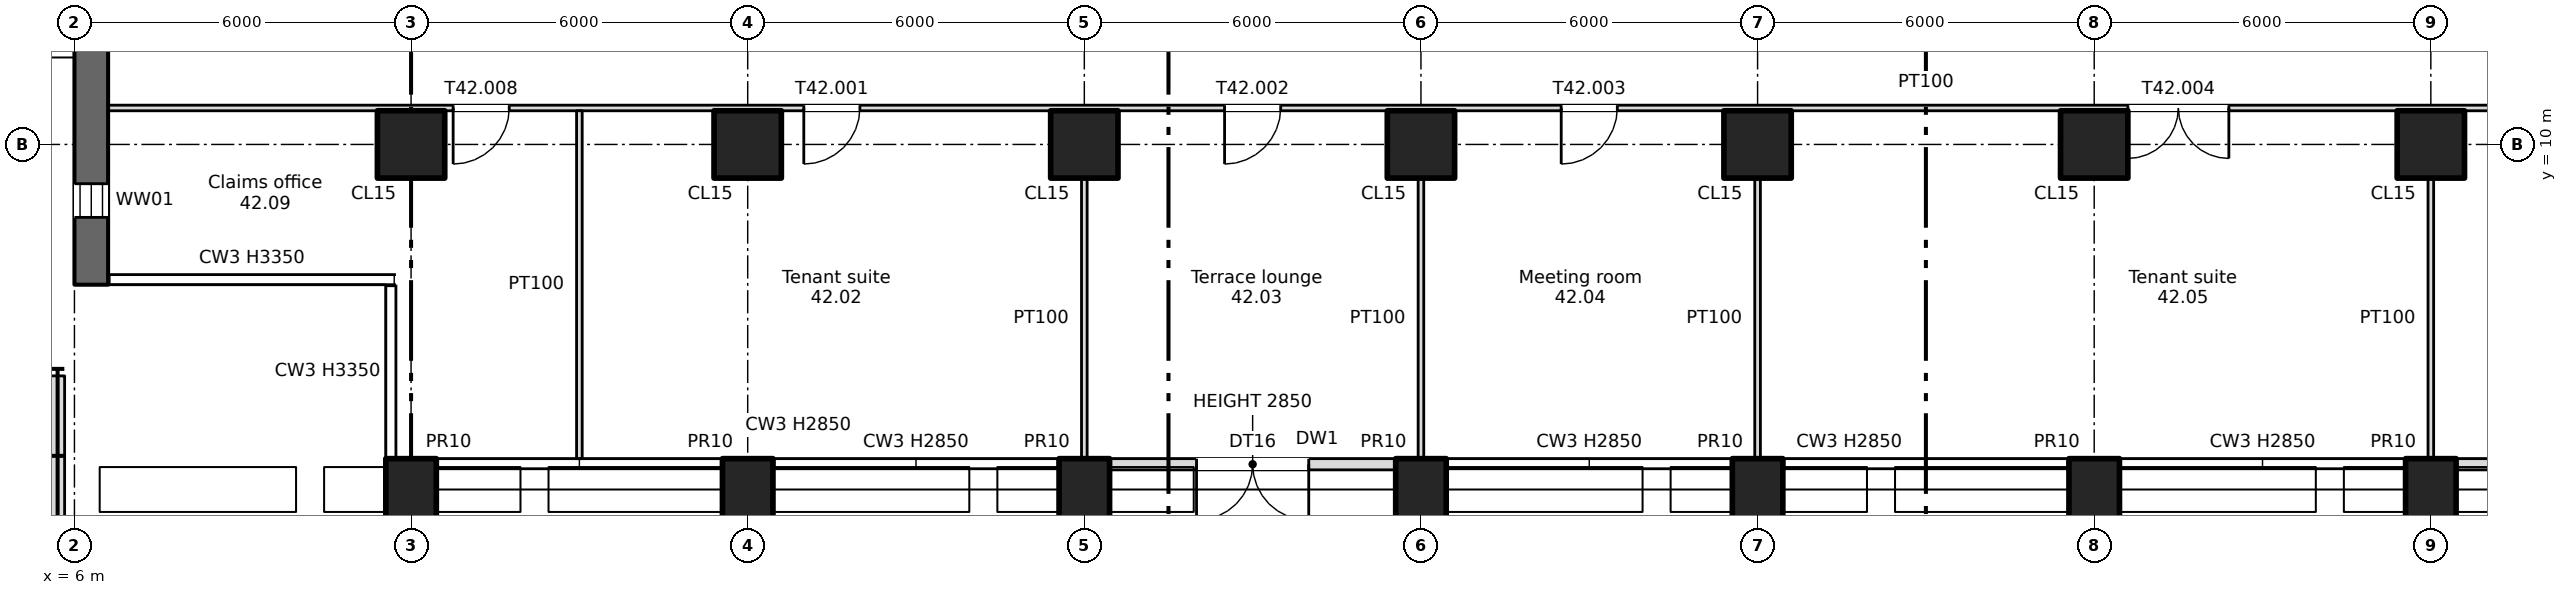
"""IFC4 building model, lengths in metres.
Left out: names, types, materials, properties, quantities, classifications, styles, units other than length and angle.
Written with IfcOpenShell. Run it as: python <this file> out.ifc"""

import sys

from ifc_helpers import new_model, si_unit, direction, frame, frame_2d, origin, origin_2d, place, context, subcontext, project, spatial, rectangle, extrude, element, fill, save


model = new_model("IFC4")
c1 = context("Model", 3, precision=1e-05, world=origin(), true_north=direction((0.0, 1.0)))
c2 = subcontext(c1, "Body", "Model", "MODEL_VIEW")
j1 = project(units=[si_unit("LENGTHUNIT", "METRE"), si_unit("PLANEANGLEUNIT", "RADIAN")], contexts=[c1])
p1 = place(None, origin())
s1 = spatial("IfcSite", under=j1, at=p1, CompositionType="ELEMENT")
p2 = place(p1, origin())
s2 = spatial("IfcBuilding", under=s1, at=p2, CompositionType="ELEMENT")
p3 = place(p2, frame((0.0, 0.0, 166.75)))
s3 = spatial("IfcBuildingStorey", under=s2, at=p3, CompositionType="ELEMENT", Elevation=166.75)
for number, where, z_axis, x_axis in (
    (1, (12.0, 3.7, 0.0), (0.0, 0.0, 1.0), (1.0, 0.0, 0.0)),
    (2, (18.0, 3.7, 0.0), (0.0, 0.0, 1.0), (1.0, 0.0, 0.0)),
    (3, (24.0, 3.7, 0.0), (0.0, 0.0, 1.0), (1.0, 0.0, 0.0)),
    (4, (30.0, 3.7, 0.0), (0.0, 0.0, 1.0), (1.0, 0.0, 0.0)),
    (5, (36.0, 3.7, 0.0), (0.0, 0.0, 1.0), (1.0, 0.0, 0.0)),
    (6, (42.0, 3.7, 0.0), (0.0, 0.0, 1.0), (1.0, 0.0, 0.0)),
    (7, (48.0, 3.7, 0.0), (0.0, 0.0, 1.0), (1.0, 0.0, 0.0)),
):
    element("IfcColumn", number, at=place(p3, frame(where, z_axis=z_axis, x_axis=x_axis)), inside=s3, PredefinedType="COLUMN", context=c2, shape_type="SweptSolid", body=[
        extrude(rectangle(XDim=0.9, YDim=1.4, at=origin_2d()), origin(), (0.0, 0.0, 1.0), 3.35),
    ])
for number, where, z_axis, x_axis in (
    (8, (12.0, 10.0, 0.0), (0.0, 0.0, 1.0), (1.0, 0.0, 0.0)),
    (9, (18.0, 10.0, 0.0), (0.0, 0.0, 1.0), (1.0, 0.0, 0.0)),
    (10, (24.0, 10.0, 0.0), (0.0, 0.0, 1.0), (1.0, 0.0, 0.0)),
    (11, (30.0, 10.0, 0.0), (0.0, 0.0, 1.0), (1.0, 0.0, 0.0)),
    (12, (36.0, 10.0, 0.0), (0.0, 0.0, 1.0), (1.0, 0.0, 0.0)),
    (13, (42.0, 10.0, 0.0), (0.0, 0.0, 1.0), (1.0, 0.0, 0.0)),
    (14, (48.0, 10.0, 0.0), (0.0, 0.0, 1.0), (1.0, 0.0, 0.0)),
):
    element("IfcColumn", number, at=place(p3, frame(where, z_axis=z_axis, x_axis=x_axis)), inside=s3, PredefinedType="COLUMN", context=c2, shape_type="SweptSolid", body=[
        extrude(rectangle(XDim=1.2, YDim=1.2, at=origin_2d()), origin(), (0.0, 0.0, 1.0), 3.35),
    ])
p4 = place(p3, frame((6.3, 7.5, 0.0), z_axis=(0.0, 0.0, 1.0), x_axis=(0.0, 1.0, 0.0)))
e15 = element("IfcWall", 15, at=p4, inside=s3, PredefinedType="SHEAR", context=c2, shape_type="SweptSolid", body=[
    extrude(rectangle(XDim=34.0, YDim=0.6, at=frame_2d((17.0, 0.0))), origin(), (0.0, 0.0, 1.0), 3.35),
])
p5 = place(p4, frame((1.2, 0.0, 0.6)))
e16 = element("IfcOpeningElement", 16, at=p5, cuts=e15, PredefinedType="OPENING", context=c2, shape_type="SweptSolid", body=[
    extrude(rectangle(XDim=0.6, YDim=2.4, at=frame_2d((0.3, 1.2))), frame((0.0, 0.31, 0.0), z_axis=(0.0, -1.0, 0.0), x_axis=(1.0, 0.0, 0.0)), (0.0, 0.0, 1.0), 0.62),
])
p6 = place(p4, frame((13.2, 0.0, 0.6)))
e17 = element("IfcOpeningElement", 17, at=p6, cuts=e15, PredefinedType="OPENING", context=c2, shape_type="SweptSolid", body=[
    extrude(rectangle(XDim=0.6, YDim=2.4, at=frame_2d((0.3, 1.2))), frame((0.0, 0.31, 0.0), z_axis=(0.0, -1.0, 0.0), x_axis=(1.0, 0.0, 0.0)), (0.0, 0.0, 1.0), 0.62),
])
p7 = place(p4, frame((19.2, 0.0, 0.6)))
e18 = element("IfcOpeningElement", 18, at=p7, cuts=e15, PredefinedType="OPENING", context=c2, shape_type="SweptSolid", body=[
    extrude(rectangle(XDim=0.6, YDim=2.4, at=frame_2d((0.3, 1.2))), frame((0.0, 0.31, 0.0), z_axis=(0.0, -1.0, 0.0), x_axis=(1.0, 0.0, 0.0)), (0.0, 0.0, 1.0), 0.62),
])
p8 = place(p4, frame((6.9, 0.0, 0.0)))
e19 = element("IfcOpeningElement", 19, at=p8, cuts=e15, PredefinedType="OPENING", context=c2, shape_type="SweptSolid", body=[
    extrude(rectangle(XDim=1.2, YDim=2.4, at=frame_2d((0.6, 1.2))), frame((0.0, 0.31, 0.0), z_axis=(0.0, -1.0, 0.0), x_axis=(1.0, 0.0, 0.0)), (0.0, 0.0, 1.0), 0.62),
])
p9 = place(p3, frame((24.45, 4.3, 0.0), z_axis=(0.0, 0.0, 1.0), x_axis=(1.0, 0.0, 0.0)))
e20 = element("IfcWall", 20, at=p9, inside=s3, PredefinedType="SOLIDWALL", context=c2, shape_type="SweptSolid", body=[
    extrude(rectangle(XDim=5.1, YDim=0.2, at=frame_2d((2.55, 0.0))), origin(), (0.0, 0.0, 1.0), 2.85),
])
p10 = place(p9, frame((1.55, 0.0, 0.0)))
e21 = element("IfcOpeningElement", 21, at=p10, cuts=e20, PredefinedType="OPENING", context=c2, shape_type="SweptSolid", body=[
    extrude(rectangle(XDim=2.0, YDim=2.4, at=frame_2d((1.0, 1.2))), frame((0.0, 0.11, 0.0), z_axis=(0.0, -1.0, 0.0), x_axis=(1.0, 0.0, 0.0)), (0.0, 0.0, 1.0), 0.22),
])
p11 = place(p3, frame((48.45, 4.3, 0.0), z_axis=(0.0, 0.0, 1.0), x_axis=(1.0, 0.0, 0.0)))
e22 = element("IfcWall", 22, at=p11, inside=s3, PredefinedType="SOLIDWALL", context=c2, shape_type="SweptSolid", body=[
    extrude(rectangle(XDim=5.1, YDim=0.2, at=frame_2d((2.55, 0.0))), origin(), (0.0, 0.0, 1.0), 2.85),
])
p12 = place(p11, frame((1.55, 0.0, 0.0)))
e23 = element("IfcOpeningElement", 23, at=p12, cuts=e22, PredefinedType="OPENING", context=c2, shape_type="SweptSolid", body=[
    extrude(rectangle(XDim=2.0, YDim=2.4, at=frame_2d((1.0, 1.2))), frame((0.0, 0.11, 0.0), z_axis=(0.0, -1.0, 0.0), x_axis=(1.0, 0.0, 0.0)), (0.0, 0.0, 1.0), 0.22),
])
p13 = place(p3, frame((5.7, 3.025, 0.0), z_axis=(0.0, 0.0, 1.0), x_axis=(0.0, 1.0, 0.0)))
e24 = element("IfcWall", 24, at=p13, inside=s3, PredefinedType="PARAPET", context=c2, shape_type="SweptSolid", body=[
    extrude(rectangle(XDim=2.85, YDim=0.25, at=frame_2d((1.425, 0.0))), origin(), (0.0, 0.0, 1.0), 0.3),
])
p14 = place(p3, frame((6.6, 10.65, 0.0), z_axis=(0.0, 0.0, 1.0), x_axis=(1.0, 0.0, 0.0)))
e25 = element("IfcWall", 25, at=p14, inside=s3, PredefinedType="PARTITIONING", context=c2, shape_type="SweptSolid", body=[
    extrude(rectangle(XDim=64.8, YDim=0.1, at=frame_2d((32.4, 0.0))), origin(), (0.0, 0.0, 1.0), 3.35),
])
p15 = place(p14, frame((12.4, 0.0, 0.0)))
e26 = element("IfcOpeningElement", 26, at=p15, cuts=e25, PredefinedType="OPENING", context=c2, shape_type="SweptSolid", body=[
    extrude(rectangle(XDim=1.0, YDim=2.1, at=frame_2d((0.5, 1.05))), frame((0.0, 0.06, 0.0), z_axis=(0.0, -1.0, 0.0), x_axis=(1.0, 0.0, 0.0)), (0.0, 0.0, 1.0), 0.12),
])
p16 = place(p14, frame((19.9, 0.0, 0.0)))
e27 = element("IfcOpeningElement", 27, at=p16, cuts=e25, PredefinedType="OPENING", context=c2, shape_type="SweptSolid", body=[
    extrude(rectangle(XDim=1.0, YDim=2.1, at=frame_2d((0.5, 1.05))), frame((0.0, 0.06, 0.0), z_axis=(0.0, -1.0, 0.0), x_axis=(1.0, 0.0, 0.0)), (0.0, 0.0, 1.0), 0.12),
])
p17 = place(p14, frame((25.9, 0.0, 0.0)))
e28 = element("IfcOpeningElement", 28, at=p17, cuts=e25, PredefinedType="OPENING", context=c2, shape_type="SweptSolid", body=[
    extrude(rectangle(XDim=1.0, YDim=2.1, at=frame_2d((0.5, 1.05))), frame((0.0, 0.06, 0.0), z_axis=(0.0, -1.0, 0.0), x_axis=(1.0, 0.0, 0.0)), (0.0, 0.0, 1.0), 0.12),
])
p18 = place(p14, frame((36.0, 0.0, 0.0)))
e29 = element("IfcOpeningElement", 29, at=p18, cuts=e25, PredefinedType="OPENING", context=c2, shape_type="SweptSolid", body=[
    extrude(rectangle(XDim=1.8, YDim=2.1, at=frame_2d((0.9, 1.05))), frame((0.0, 0.06, 0.0), z_axis=(0.0, -1.0, 0.0), x_axis=(1.0, 0.0, 0.0)), (0.0, 0.0, 1.0), 0.12),
])
p19 = place(p14, frame((43.9, 0.0, 0.0)))
e30 = element("IfcOpeningElement", 30, at=p19, cuts=e25, PredefinedType="OPENING", context=c2, shape_type="SweptSolid", body=[
    extrude(rectangle(XDim=1.0, YDim=2.1, at=frame_2d((0.5, 1.05))), frame((0.0, 0.06, 0.0), z_axis=(0.0, -1.0, 0.0), x_axis=(1.0, 0.0, 0.0)), (0.0, 0.0, 1.0), 0.12),
])
p20 = place(p14, frame((49.9, 0.0, 0.0)))
e31 = element("IfcOpeningElement", 31, at=p20, cuts=e25, PredefinedType="OPENING", context=c2, shape_type="SweptSolid", body=[
    extrude(rectangle(XDim=1.0, YDim=2.1, at=frame_2d((0.5, 1.05))), frame((0.0, 0.06, 0.0), z_axis=(0.0, -1.0, 0.0), x_axis=(1.0, 0.0, 0.0)), (0.0, 0.0, 1.0), 0.12),
])
p21 = place(p14, frame((57.6, 0.0, 0.0)))
e32 = element("IfcOpeningElement", 32, at=p21, cuts=e25, PredefinedType="OPENING", context=c2, shape_type="SweptSolid", body=[
    extrude(rectangle(XDim=1.0, YDim=2.1, at=frame_2d((0.5, 1.05))), frame((0.0, 0.06, 0.0), z_axis=(0.0, -1.0, 0.0), x_axis=(1.0, 0.0, 0.0)), (0.0, 0.0, 1.0), 0.12),
])
p22 = place(p14, frame((6.15, 0.0, 0.0)))
e33 = element("IfcOpeningElement", 33, at=p22, cuts=e25, PredefinedType="OPENING", context=c2, shape_type="SweptSolid", body=[
    extrude(rectangle(XDim=1.0, YDim=2.1, at=frame_2d((0.5, 1.05))), frame((0.0, 0.06, 0.0), z_axis=(0.0, -1.0, 0.0), x_axis=(1.0, 0.0, 0.0)), (0.0, 0.0, 1.0), 0.12),
])
p23 = place(p3, frame((15.0, 4.4, 0.0), z_axis=(0.0, 0.0, 1.0), x_axis=(0.0, 1.0, 0.0)))
e34 = element("IfcWall", 34, at=p23, inside=s3, PredefinedType="PARTITIONING", context=c2, shape_type="SweptSolid", body=[
    extrude(rectangle(XDim=6.2, YDim=0.1, at=frame_2d((3.1, 0.0))), origin(), (0.0, 0.0, 1.0), 3.35),
])
for number, where, z_axis, x_axis in (
    (35, (24.0, 4.4, 0.0), (0.0, 0.0, 1.0), (0.0, 1.0, 0.0)),
    (36, (30.0, 4.4, 0.0), (0.0, 0.0, 1.0), (0.0, 1.0, 0.0)),
    (37, (36.0, 4.4, 0.0), (0.0, 0.0, 1.0), (0.0, 1.0, 0.0)),
    (38, (48.0, 4.4, 0.0), (0.0, 0.0, 1.0), (0.0, 1.0, 0.0)),
):
    element("IfcWall", number, at=place(p3, frame(where, z_axis=z_axis, x_axis=x_axis)), inside=s3, PredefinedType="PARTITIONING", context=c2, shape_type="SweptSolid", body=[
        extrude(rectangle(XDim=5.0, YDim=0.1, at=frame_2d((2.5, 0.0))), origin(), (0.0, 0.0, 1.0), 3.35),
    ])
p24 = place(p5, origin())
e39 = element("IfcWindow", 39, at=p24, inside=s3, PartitioningType="SINGLE_PANEL", PredefinedType="WINDOW", context=c2, shape_type="SweptSolid", body=[
    extrude(rectangle(XDim=0.6, YDim=2.4, at=frame_2d((0.3, 1.2))), frame((0.0, 0.03, 0.0), z_axis=(0.0, -1.0, 0.0), x_axis=(1.0, 0.0, 0.0)), (0.0, 0.0, 1.0), 0.06),
])
fill(e16, e39)
p25 = place(p10, frame((2.0, 0.0, 0.0), z_axis=(0.0, 0.0, 1.0), x_axis=(-1.0, 0.0, 0.0)))
e40 = element("IfcDoor", 40, at=p25, inside=s3, OperationType="DOUBLE_DOOR_SINGLE_SWING", PredefinedType="DOOR", context=c2, shape_type="SweptSolid", body=[
    extrude(rectangle(XDim=2.0, YDim=2.4, at=frame_2d((1.0, 1.2))), frame((0.0, 0.025, 0.0), z_axis=(0.0, -1.0, 0.0), x_axis=(1.0, 0.0, 0.0)), (0.0, 0.0, 1.0), 0.05),
])
fill(e21, e40)
p26 = place(p15, origin())
e41 = element("IfcDoor", 41, at=p26, inside=s3, OperationType="SINGLE_SWING_LEFT", PredefinedType="DOOR", context=c2, shape_type="SweptSolid", body=[
    extrude(rectangle(XDim=1.0, YDim=2.1, at=frame_2d((0.5, 1.05))), frame((0.0, 0.025, 0.0), z_axis=(0.0, -1.0, 0.0), x_axis=(1.0, 0.0, 0.0)), (0.0, 0.0, 1.0), 0.05),
])
fill(e26, e41)
p27 = place(p16, origin())
e42 = element("IfcDoor", 42, at=p27, inside=s3, OperationType="SINGLE_SWING_LEFT", PredefinedType="DOOR", context=c2, shape_type="SweptSolid", body=[
    extrude(rectangle(XDim=1.0, YDim=2.1, at=frame_2d((0.5, 1.05))), frame((0.0, 0.025, 0.0), z_axis=(0.0, -1.0, 0.0), x_axis=(1.0, 0.0, 0.0)), (0.0, 0.0, 1.0), 0.05),
])
fill(e27, e42)
p28 = place(p17, origin())
e43 = element("IfcDoor", 43, at=p28, inside=s3, OperationType="SINGLE_SWING_LEFT", PredefinedType="DOOR", context=c2, shape_type="SweptSolid", body=[
    extrude(rectangle(XDim=1.0, YDim=2.1, at=frame_2d((0.5, 1.05))), frame((0.0, 0.025, 0.0), z_axis=(0.0, -1.0, 0.0), x_axis=(1.0, 0.0, 0.0)), (0.0, 0.0, 1.0), 0.05),
])
fill(e28, e43)
p29 = place(p18, origin())
e44 = element("IfcDoor", 44, at=p29, inside=s3, OperationType="DOUBLE_DOOR_SINGLE_SWING", PredefinedType="DOOR", context=c2, shape_type="SweptSolid", body=[
    extrude(rectangle(XDim=1.8, YDim=2.1, at=frame_2d((0.9, 1.05))), frame((0.0, 0.025, 0.0), z_axis=(0.0, -1.0, 0.0), x_axis=(1.0, 0.0, 0.0)), (0.0, 0.0, 1.0), 0.05),
])
fill(e29, e44)
p30 = place(p22, origin())
e45 = element("IfcDoor", 45, at=p30, inside=s3, OperationType="SINGLE_SWING_LEFT", PredefinedType="DOOR", context=c2, shape_type="SweptSolid", body=[
    extrude(rectangle(XDim=1.0, YDim=2.1, at=frame_2d((0.5, 1.05))), frame((0.0, 0.025, 0.0), z_axis=(0.0, -1.0, 0.0), x_axis=(1.0, 0.0, 0.0)), (0.0, 0.0, 1.0), 0.05),
])
fill(e33, e45)
save(model, sys.argv[1])
